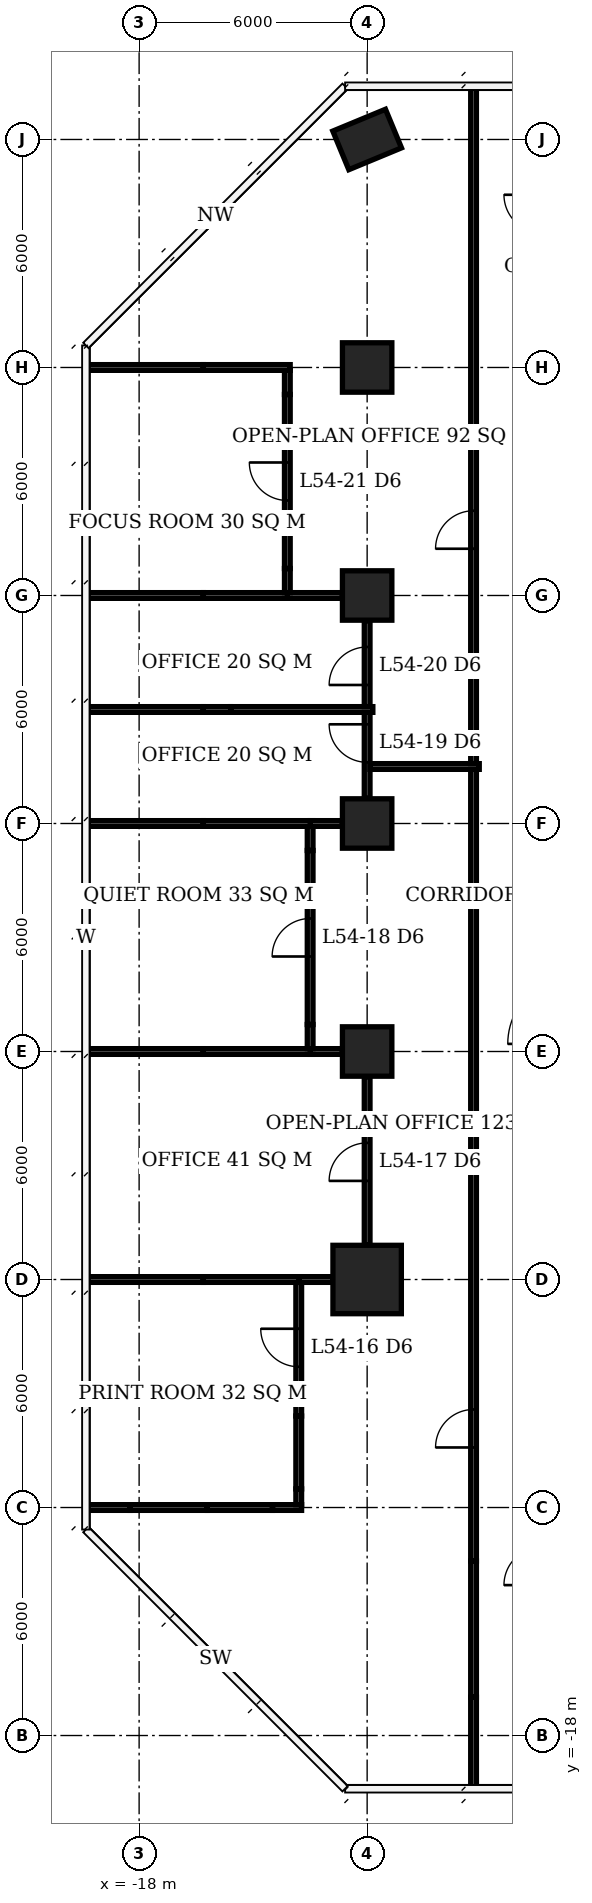
"""IFC4 building model, lengths in metres.
Left out: names, types, materials, properties, quantities, classifications, styles, units other than length and angle.
Written with IfcOpenShell. Run it as: python <this file> out.ifc"""

import sys

from ifc_helpers import new_model, si_unit, direction, frame, frame_2d, origin, origin_2d, place, context, subcontext, project, spatial, rectangle, extrude, element, fill, save


model = new_model("IFC4")
c1 = context("Model", 3, precision=1e-05, world=origin(), true_north=direction((0.0, 1.0)))
c2 = subcontext(c1, "Body", "Model", "MODEL_VIEW")
j1 = project(units=[si_unit("LENGTHUNIT", "METRE"), si_unit("PLANEANGLEUNIT", "RADIAN")], contexts=[c1])
p1 = place(None, origin())
s1 = spatial("IfcSite", under=j1, at=p1, CompositionType="ELEMENT")
p2 = place(p1, origin())
s2 = spatial("IfcBuilding", under=s1, at=p2, CompositionType="ELEMENT")
p3 = place(p2, frame((0.0, 0.0, 220.1)))
s3 = spatial("IfcBuildingStorey", under=s2, at=p3, CompositionType="ELEMENT", Elevation=220.1)
p4 = place(p3, frame((-12.0, -6.0, 0.0), z_axis=(0.0, 0.0, 1.0), x_axis=(1.0, 0.0, 0.0)))
e1 = element("IfcColumn", 1, at=p4, inside=s3, PredefinedType="COLUMN", context=c2, shape_type="SweptSolid", body=[
    extrude(rectangle(XDim=1.8, YDim=1.8, at=origin_2d()), origin(), (0.0, 0.0, 1.0), 3.9),
])
for number, where, z_axis, x_axis in (
    (2, (-12.0, 0.0, 0.0), (0.0, 0.0, 1.0), (1.0, 0.0, 0.0)),
    (3, (-12.0, 6.0, 0.0), (0.0, 0.0, 1.0), (1.0, 0.0, 0.0)),
    (4, (-12.0, 12.0, 0.0), (0.0, 0.0, 1.0), (1.0, 0.0, 0.0)),
    (5, (-12.0, 18.0, 0.0), (0.0, 0.0, 1.0), (1.0, 0.0, 0.0)),
):
    element("IfcColumn", number, at=place(p3, frame(where, z_axis=z_axis, x_axis=x_axis)), inside=s3, PredefinedType="COLUMN", context=c2, shape_type="SweptSolid", body=[
        extrude(rectangle(XDim=1.3, YDim=1.3, at=origin_2d()), origin(), (0.0, 0.0, 1.0), 3.9),
    ])
p5 = place(p3, frame((-12.0, 24.0, 0.0), z_axis=(0.0, 0.0, 1.0), x_axis=(0.923879532511, 0.382683432365, 0.0)))
e6 = element("IfcColumn", 6, at=p5, inside=s3, PredefinedType="COLUMN", context=c2, shape_type="SweptSolid", body=[
    extrude(rectangle(XDim=1.5, YDim=1.1, at=origin_2d()), origin(), (0.0, 0.0, 1.0), 3.9),
])
p6 = place(p3, frame((-19.4, -12.0, 0.0), z_axis=(0.0, 0.0, 1.0), x_axis=(1.0, 0.0, 0.0)))
e7 = element("IfcWall", 7, at=p6, inside=s3, PredefinedType="PARTITIONING", context=c2, shape_type="SweptSolid", body=[
    extrude(rectangle(XDim=1.163, YDim=0.15, at=frame_2d((0.582, 0.0))), origin(), (0.0, 0.0, 1.0), 3.65),
])
p7 = place(p3, frame((-18.237, -12.0, 0.0), z_axis=(0.0, 0.0, 1.0), x_axis=(1.0, 0.0, 0.0)))
e8 = element("IfcWall", 8, at=p7, inside=s3, PredefinedType="PARTITIONING", context=c2, shape_type="SweptSolid", body=[
    extrude(rectangle(XDim=2.029, YDim=0.15, at=frame_2d((1.015, 0.0))), origin(), (0.0, 0.0, 1.0), 2.65),
])
p8 = place(p3, frame((-16.208, -12.0, 0.0), z_axis=(0.0, 0.0, 1.0), x_axis=(1.0, 0.0, 0.0)))
e9 = element("IfcWall", 9, at=p8, inside=s3, PredefinedType="PARTITIONING", context=c2, shape_type="SweptSolid", body=[
    extrude(rectangle(XDim=1.718, YDim=0.15, at=frame_2d((0.859, 0.0))), origin(), (0.0, 0.0, 1.0), 3.65),
])
p9 = place(p3, frame((-14.49, -12.0, 0.0), z_axis=(0.0, 0.0, 1.0), x_axis=(1.0, 0.0, 0.0)))
e10 = element("IfcWall", 10, at=p9, inside=s3, PredefinedType="PARTITIONING", context=c2, shape_type="SweptSolid", body=[
    extrude(rectangle(XDim=0.765, YDim=0.15, at=frame_2d((0.382, 0.0))), origin(), (0.0, 0.0, 1.0), 2.65),
])
p10 = place(p3, frame((-19.4, -6.0, 0.0), z_axis=(0.0, 0.0, 1.0), x_axis=(1.0, 0.0, 0.0)))
e11 = element("IfcWall", 11, at=p10, inside=s3, PredefinedType="PARTITIONING", context=c2, shape_type="SweptSolid", body=[
    extrude(rectangle(XDim=3.09, YDim=0.15, at=frame_2d((1.545, 0.0))), origin(), (0.0, 0.0, 1.0), 3.65),
])
p11 = place(p3, frame((-16.31, -6.0, 0.0), z_axis=(0.0, 0.0, 1.0), x_axis=(1.0, 0.0, 0.0)))
e12 = element("IfcWall", 12, at=p11, inside=s3, PredefinedType="PARTITIONING", context=c2, shape_type="SweptSolid", body=[
    extrude(rectangle(XDim=2.585, YDim=0.15, at=frame_2d((1.292, 0.0))), origin(), (0.0, 0.0, 1.0), 2.65),
])
p12 = place(p3, frame((-13.8, -6.0, 0.0), z_axis=(0.0, 0.0, 1.0), x_axis=(1.0, 0.0, 0.0)))
e13 = element("IfcWall", 13, at=p12, inside=s3, PredefinedType="PARTITIONING", context=c2, shape_type="SweptSolid", body=[
    extrude(rectangle(XDim=0.9, YDim=0.15, at=frame_2d((0.45, 0.0))), origin(), (0.0, 0.0, 1.0), 2.65),
])
p13 = place(p3, frame((-19.35, 0.0, 0.0), z_axis=(0.0, 0.0, 1.0), x_axis=(1.0, 0.0, 0.0)))
e14 = element("IfcWall", 14, at=p13, inside=s3, PredefinedType="PARTITIONING", context=c2, shape_type="SweptSolid", body=[
    extrude(rectangle(XDim=3.04, YDim=0.15, at=frame_2d((1.52, 0.0))), origin(), (0.0, 0.0, 1.0), 3.65),
])
p14 = place(p3, frame((-16.31, 0.0, 0.0), z_axis=(0.0, 0.0, 1.0), x_axis=(1.0, 0.0, 0.0)))
e15 = element("IfcWall", 15, at=p14, inside=s3, PredefinedType="PARTITIONING", context=c2, shape_type="SweptSolid", body=[
    extrude(rectangle(XDim=2.885, YDim=0.15, at=frame_2d((1.442, 0.0))), origin(), (0.0, 0.0, 1.0), 2.65),
])
p15 = place(p3, frame((-13.5, 0.0, 0.0), z_axis=(0.0, 0.0, 1.0), x_axis=(1.0, 0.0, 0.0)))
e16 = element("IfcWall", 16, at=p15, inside=s3, PredefinedType="PARTITIONING", context=c2, shape_type="SweptSolid", body=[
    extrude(rectangle(XDim=0.85, YDim=0.15, at=frame_2d((0.425, 0.0))), origin(), (0.0, 0.0, 1.0), 2.65),
])
p16 = place(p3, frame((-19.35, 6.0, 0.0), z_axis=(0.0, 0.0, 1.0), x_axis=(1.0, 0.0, 0.0)))
e17 = element("IfcWall", 17, at=p16, inside=s3, PredefinedType="PARTITIONING", context=c2, shape_type="SweptSolid", body=[
    extrude(rectangle(XDim=3.04, YDim=0.15, at=frame_2d((1.52, 0.0))), origin(), (0.0, 0.0, 1.0), 3.65),
])
p17 = place(p3, frame((-16.31, 6.0, 0.0), z_axis=(0.0, 0.0, 1.0), x_axis=(1.0, 0.0, 0.0)))
e18 = element("IfcWall", 18, at=p17, inside=s3, PredefinedType="PARTITIONING", context=c2, shape_type="SweptSolid", body=[
    extrude(rectangle(XDim=2.885, YDim=0.15, at=frame_2d((1.442, 0.0))), origin(), (0.0, 0.0, 1.0), 2.65),
])
p18 = place(p3, frame((-13.5, 6.0, 0.0), z_axis=(0.0, 0.0, 1.0), x_axis=(1.0, 0.0, 0.0)))
e19 = element("IfcWall", 19, at=p18, inside=s3, PredefinedType="PARTITIONING", context=c2, shape_type="SweptSolid", body=[
    extrude(rectangle(XDim=0.85, YDim=0.15, at=frame_2d((0.425, 0.0))), origin(), (0.0, 0.0, 1.0), 2.65),
])
p19 = place(p3, frame((-19.4, 9.0, 0.0), z_axis=(0.0, 0.0, 1.0), x_axis=(1.0, 0.0, 0.0)))
e20 = element("IfcWall", 20, at=p19, inside=s3, PredefinedType="PARTITIONING", context=c2, shape_type="SweptSolid", body=[
    extrude(rectangle(XDim=3.09, YDim=0.15, at=frame_2d((1.545, 0.0))), origin(), (0.0, 0.0, 1.0), 3.65),
])
p20 = place(p3, frame((-16.31, 9.0, 0.0), z_axis=(0.0, 0.0, 1.0), x_axis=(1.0, 0.0, 0.0)))
e21 = element("IfcWall", 21, at=p20, inside=s3, PredefinedType="PARTITIONING", context=c2, shape_type="SweptSolid", body=[
    extrude(rectangle(XDim=0.72, YDim=0.15, at=frame_2d((0.36, 0.0))), origin(), (0.0, 0.0, 1.0), 2.65),
])
p21 = place(p3, frame((-15.59, 9.0, 0.0), z_axis=(0.0, 0.0, 1.0), x_axis=(1.0, 0.0, 0.0)))
e22 = element("IfcWall", 22, at=p21, inside=s3, PredefinedType="PARTITIONING", context=c2, shape_type="SweptSolid", body=[
    extrude(rectangle(XDim=3.74, YDim=0.15, at=frame_2d((1.87, 0.0))), origin(), (0.0, 0.0, 1.0), 3.65),
])
p22 = place(p3, frame((-19.4, 12.0, 0.0), z_axis=(0.0, 0.0, 1.0), x_axis=(1.0, 0.0, 0.0)))
e23 = element("IfcWall", 23, at=p22, inside=s3, PredefinedType="PARTITIONING", context=c2, shape_type="SweptSolid", body=[
    extrude(rectangle(XDim=3.09, YDim=0.15, at=frame_2d((1.545, 0.0))), origin(), (0.0, 0.0, 1.0), 3.65),
])
p23 = place(p3, frame((-16.31, 12.0, 0.0), z_axis=(0.0, 0.0, 1.0), x_axis=(1.0, 0.0, 0.0)))
e24 = element("IfcWall", 24, at=p23, inside=s3, PredefinedType="PARTITIONING", context=c2, shape_type="SweptSolid", body=[
    extrude(rectangle(XDim=2.285, YDim=0.15, at=frame_2d((1.143, 0.0))), origin(), (0.0, 0.0, 1.0), 2.65),
])
p24 = place(p3, frame((-14.1, 12.0, 0.0), z_axis=(0.0, 0.0, 1.0), x_axis=(1.0, 0.0, 0.0)))
e25 = element("IfcWall", 25, at=p24, inside=s3, PredefinedType="PARTITIONING", context=c2, shape_type="SweptSolid", body=[
    extrude(rectangle(XDim=1.45, YDim=0.15, at=frame_2d((0.725, 0.0))), origin(), (0.0, 0.0, 1.0), 2.65),
])
p25 = place(p3, frame((-19.4, 18.0, 0.0), z_axis=(0.0, 0.0, 1.0), x_axis=(1.0, 0.0, 0.0)))
e26 = element("IfcWall", 26, at=p25, inside=s3, PredefinedType="PARTITIONING", context=c2, shape_type="SweptSolid", body=[
    extrude(rectangle(XDim=3.09, YDim=0.15, at=frame_2d((1.545, 0.0))), origin(), (0.0, 0.0, 1.0), 3.65),
])
p26 = place(p3, frame((-16.31, 18.0, 0.0), z_axis=(0.0, 0.0, 1.0), x_axis=(1.0, 0.0, 0.0)))
e27 = element("IfcWall", 27, at=p26, inside=s3, PredefinedType="PARTITIONING", context=c2, shape_type="SweptSolid", body=[
    extrude(rectangle(XDim=2.285, YDim=0.15, at=frame_2d((1.143, 0.0))), origin(), (0.0, 0.0, 1.0), 2.65),
])
p27 = place(p3, frame((-14.1, 12.075, 0.0), z_axis=(0.0, 0.0, 1.0), x_axis=(0.0, 1.0, 0.0)))
e28 = element("IfcWall", 28, at=p27, inside=s3, PredefinedType="PARTITIONING", context=c2, shape_type="SweptSolid", body=[
    extrude(rectangle(XDim=0.635, YDim=0.15, at=frame_2d((0.317, 0.0))), origin(), (0.0, 0.0, 1.0), 2.65),
])
p28 = place(p3, frame((-14.1, 12.71, 0.0), z_axis=(0.0, 0.0, 1.0), x_axis=(0.0, 1.0, 0.0)))
e29 = element("IfcWall", 29, at=p28, inside=s3, PredefinedType="PARTITIONING", context=c2, shape_type="SweptSolid", body=[
    extrude(rectangle(XDim=4.58, YDim=0.15, at=frame_2d((2.29, 0.0))), origin(), (0.0, 0.0, 1.0), 3.65),
])
p29 = place(p28, frame((1.79, 0.0, 0.0)))
e30 = element("IfcOpeningElement", 30, at=p29, cuts=e29, PredefinedType="OPENING", context=c2, shape_type="SweptSolid", body=[
    extrude(rectangle(XDim=1.0, YDim=2.1, at=frame_2d((0.5, 1.05))), frame((0.0, 0.085, 0.0), z_axis=(0.0, -1.0, 0.0), x_axis=(1.0, 0.0, 0.0)), (0.0, 0.0, 1.0), 0.17),
])
p30 = place(p3, frame((-14.1, 17.29, 0.0), z_axis=(0.0, 0.0, 1.0), x_axis=(0.0, 1.0, 0.0)))
e31 = element("IfcWall", 31, at=p30, inside=s3, PredefinedType="PARTITIONING", context=c2, shape_type="SweptSolid", body=[
    extrude(rectangle(XDim=0.635, YDim=0.15, at=frame_2d((0.317, 0.0))), origin(), (0.0, 0.0, 1.0), 2.65),
])
p31 = place(p3, frame((-13.8, -11.925, 0.0), z_axis=(0.0, 0.0, 1.0), x_axis=(0.0, 1.0, 0.0)))
e32 = element("IfcWall", 32, at=p31, inside=s3, PredefinedType="PARTITIONING", context=c2, shape_type="SweptSolid", body=[
    extrude(rectangle(XDim=0.415, YDim=0.15, at=frame_2d((0.208, 0.0))), origin(), (0.0, 0.0, 1.0), 2.65),
])
p32 = place(p3, frame((-13.8, -11.51, 0.0), z_axis=(0.0, 0.0, 1.0), x_axis=(0.0, 1.0, 0.0)))
e33 = element("IfcWall", 33, at=p32, inside=s3, PredefinedType="PARTITIONING", context=c2, shape_type="SweptSolid", body=[
    extrude(rectangle(XDim=1.918, YDim=0.15, at=frame_2d((0.959, 0.0))), origin(), (0.0, 0.0, 1.0), 3.65),
])
p33 = place(p3, frame((-13.8, -9.592, 0.0), z_axis=(0.0, 0.0, 1.0), x_axis=(0.0, 1.0, 0.0)))
e34 = element("IfcWall", 34, at=p33, inside=s3, PredefinedType="PARTITIONING", context=c2, shape_type="SweptSolid", body=[
    extrude(rectangle(XDim=3.517, YDim=0.15, at=frame_2d((1.759, 0.0))), origin(), (0.0, 0.0, 1.0), 2.65),
])
p34 = place(p33, frame((1.296, 0.0, 0.0)))
e35 = element("IfcOpeningElement", 35, at=p34, cuts=e34, PredefinedType="OPENING", context=c2, shape_type="SweptSolid", body=[
    extrude(rectangle(XDim=1.0, YDim=2.1, at=frame_2d((0.5, 1.05))), frame((0.0, 0.085, 0.0), z_axis=(0.0, -1.0, 0.0), x_axis=(1.0, 0.0, 0.0)), (0.0, 0.0, 1.0), 0.17),
])
p35 = place(p3, frame((-13.5, 0.075, 0.0), z_axis=(0.0, 0.0, 1.0), x_axis=(0.0, 1.0, 0.0)))
e36 = element("IfcWall", 36, at=p35, inside=s3, PredefinedType="PARTITIONING", context=c2, shape_type="SweptSolid", body=[
    extrude(rectangle(XDim=0.635, YDim=0.15, at=frame_2d((0.317, 0.0))), origin(), (0.0, 0.0, 1.0), 2.65),
])
p36 = place(p3, frame((-13.5, 0.71, 0.0), z_axis=(0.0, 0.0, 1.0), x_axis=(0.0, 1.0, 0.0)))
e37 = element("IfcWall", 37, at=p36, inside=s3, PredefinedType="PARTITIONING", context=c2, shape_type="SweptSolid", body=[
    extrude(rectangle(XDim=4.58, YDim=0.15, at=frame_2d((2.29, 0.0))), origin(), (0.0, 0.0, 1.0), 3.65),
])
p37 = place(p36, frame((1.79, 0.0, 0.0)))
e38 = element("IfcOpeningElement", 38, at=p37, cuts=e37, PredefinedType="OPENING", context=c2, shape_type="SweptSolid", body=[
    extrude(rectangle(XDim=1.0, YDim=2.1, at=frame_2d((0.5, 1.05))), frame((0.0, 0.085, 0.0), z_axis=(0.0, -1.0, 0.0), x_axis=(1.0, 0.0, 0.0)), (0.0, 0.0, 1.0), 0.17),
])
p38 = place(p3, frame((-13.5, 5.29, 0.0), z_axis=(0.0, 0.0, 1.0), x_axis=(0.0, 1.0, 0.0)))
e39 = element("IfcWall", 39, at=p38, inside=s3, PredefinedType="PARTITIONING", context=c2, shape_type="SweptSolid", body=[
    extrude(rectangle(XDim=0.635, YDim=0.15, at=frame_2d((0.317, 0.0))), origin(), (0.0, 0.0, 1.0), 2.65),
])
p39 = place(p3, frame((-12.0, -5.1, 0.0), z_axis=(0.0, 0.0, 1.0), x_axis=(0.0, 1.0, 0.0)))
e40 = element("IfcWall", 40, at=p39, inside=s3, PredefinedType="PARTITIONING", context=c2, shape_type="SweptSolid", body=[
    extrude(rectangle(XDim=4.44, YDim=0.15, at=frame_2d((2.22, 0.0))), origin(), (0.0, 0.0, 1.0), 3.65),
])
p40 = place(p39, frame((1.695, 0.0, 0.0)))
e41 = element("IfcOpeningElement", 41, at=p40, cuts=e40, PredefinedType="OPENING", context=c2, shape_type="SweptSolid", body=[
    extrude(rectangle(XDim=1.0, YDim=2.1, at=frame_2d((0.5, 1.05))), frame((0.0, 0.085, 0.0), z_axis=(0.0, -1.0, 0.0), x_axis=(1.0, 0.0, 0.0)), (0.0, 0.0, 1.0), 0.17),
])
p41 = place(p3, frame((-12.0, 6.66, 0.0), z_axis=(0.0, 0.0, 1.0), x_axis=(0.0, 1.0, 0.0)))
e42 = element("IfcWall", 42, at=p41, inside=s3, PredefinedType="PARTITIONING", context=c2, shape_type="SweptSolid", body=[
    extrude(rectangle(XDim=2.265, YDim=0.15, at=frame_2d((1.133, 0.0))), origin(), (0.0, 0.0, 1.0), 3.65),
])
p42 = place(p41, frame((0.95, 0.0, 0.0)))
e43 = element("IfcOpeningElement", 43, at=p42, cuts=e42, PredefinedType="OPENING", context=c2, shape_type="SweptSolid", body=[
    extrude(rectangle(XDim=1.0, YDim=2.1, at=frame_2d((0.5, 1.05))), frame((0.0, 0.085, 0.0), z_axis=(0.0, -1.0, 0.0), x_axis=(1.0, 0.0, 0.0)), (0.0, 0.0, 1.0), 0.17),
])
p43 = place(p3, frame((-12.0, 9.075, 0.0), z_axis=(0.0, 0.0, 1.0), x_axis=(0.0, 1.0, 0.0)))
e44 = element("IfcWall", 44, at=p43, inside=s3, PredefinedType="PARTITIONING", context=c2, shape_type="SweptSolid", body=[
    extrude(rectangle(XDim=2.265, YDim=0.15, at=frame_2d((1.133, 0.0))), origin(), (0.0, 0.0, 1.0), 3.65),
])
p44 = place(p43, frame((0.57, 0.0, 0.0)))
e45 = element("IfcOpeningElement", 45, at=p44, cuts=e44, PredefinedType="OPENING", context=c2, shape_type="SweptSolid", body=[
    extrude(rectangle(XDim=1.0, YDim=2.1, at=frame_2d((0.5, 1.05))), frame((0.0, 0.085, 0.0), z_axis=(0.0, -1.0, 0.0), x_axis=(1.0, 0.0, 0.0)), (0.0, 0.0, 1.0), 0.17),
])
p45 = place(p3, frame((-11.925, 7.5, 0.0), z_axis=(0.0, 0.0, 1.0), x_axis=(1.0, 0.0, 0.0)))
e46 = element("IfcWall", 46, at=p45, inside=s3, PredefinedType="PARTITIONING", context=c2, shape_type="SweptSolid", body=[
    extrude(rectangle(XDim=2.875, YDim=0.15, at=frame_2d((1.438, 0.0))), origin(), (0.0, 0.0, 1.0), 3.65),
])
p46 = place(p3, frame((-9.2, -19.4, 0.0), z_axis=(0.0, 0.0, 1.0), x_axis=(0.0, 1.0, 0.0)))
e47 = element("IfcWall", 47, at=p46, inside=s3, PredefinedType="PARTITIONING", context=c2, shape_type="SweptSolid", body=[
    extrude(rectangle(XDim=2.408, YDim=0.15, at=frame_2d((1.204, 0.0))), origin(), (0.0, 0.0, 1.0), 3.65),
])
p47 = place(p3, frame((-9.2, -16.992, 0.0), z_axis=(0.0, 0.0, 1.0), x_axis=(0.0, 1.0, 0.0)))
e48 = element("IfcWall", 48, at=p47, inside=s3, PredefinedType="PARTITIONING", context=c2, shape_type="SweptSolid", body=[
    extrude(rectangle(XDim=3.584, YDim=0.15, at=frame_2d((1.792, 0.0))), origin(), (0.0, 0.0, 1.0), 2.65),
])
p48 = place(p3, frame((-9.2, -13.408, 0.0), z_axis=(0.0, 0.0, 1.0), x_axis=(0.0, 1.0, 0.0)))
e49 = element("IfcWall", 49, at=p48, inside=s3, PredefinedType="PARTITIONING", context=c2, shape_type="SweptSolid", body=[
    extrude(rectangle(XDim=20.833, YDim=0.15, at=frame_2d((10.417, 0.0))), origin(), (0.0, 0.0, 1.0), 3.65),
])
p49 = place(p48, frame((2.988, 0.0, 0.0)))
e50 = element("IfcOpeningElement", 50, at=p49, cuts=e49, PredefinedType="OPENING", context=c2, shape_type="SweptSolid", body=[
    extrude(rectangle(XDim=1.0, YDim=2.1, at=frame_2d((0.5, 1.05))), frame((0.0, 0.085, 0.0), z_axis=(0.0, -1.0, 0.0), x_axis=(1.0, 0.0, 0.0)), (0.0, 0.0, 1.0), 0.17),
])
p50 = place(p3, frame((-9.2, 7.575, 0.0), z_axis=(0.0, 0.0, 1.0), x_axis=(0.0, 1.0, 0.0)))
e51 = element("IfcWall", 51, at=p50, inside=s3, PredefinedType="PARTITIONING", context=c2, shape_type="SweptSolid", body=[
    extrude(rectangle(XDim=17.825, YDim=0.15, at=frame_2d((8.913, 0.0))), origin(), (0.0, 0.0, 1.0), 3.65),
])
p51 = place(p50, frame((5.655, 0.0, 0.0)))
e52 = element("IfcOpeningElement", 52, at=p51, cuts=e51, PredefinedType="OPENING", context=c2, shape_type="SweptSolid", body=[
    extrude(rectangle(XDim=1.0, YDim=2.1, at=frame_2d((0.5, 1.05))), frame((0.0, 0.085, 0.0), z_axis=(0.0, -1.0, 0.0), x_axis=(1.0, 0.0, 0.0)), (0.0, 0.0, 1.0), 0.17),
])
p52 = place(p34, origin())
e53 = element("IfcDoor", 53, at=p52, inside=s3, OperationType="SINGLE_SWING_RIGHT", PredefinedType="DOOR", context=c2, shape_type="SweptSolid", body=[
    extrude(rectangle(XDim=1.0, YDim=2.1, at=frame_2d((0.5, 1.05))), frame((0.0, 0.025, 0.0), z_axis=(0.0, -1.0, 0.0), x_axis=(1.0, 0.0, 0.0)), (0.0, 0.0, 1.0), 0.05),
])
fill(e35, e53)
p53 = place(p40, origin())
e54 = element("IfcDoor", 54, at=p53, inside=s3, OperationType="SINGLE_SWING_LEFT", PredefinedType="DOOR", context=c2, shape_type="SweptSolid", body=[
    extrude(rectangle(XDim=1.0, YDim=2.1, at=frame_2d((0.5, 1.05))), frame((0.0, 0.025, 0.0), z_axis=(0.0, -1.0, 0.0), x_axis=(1.0, 0.0, 0.0)), (0.0, 0.0, 1.0), 0.05),
])
fill(e41, e54)
p54 = place(p37, origin())
e55 = element("IfcDoor", 55, at=p54, inside=s3, OperationType="SINGLE_SWING_LEFT", PredefinedType="DOOR", context=c2, shape_type="SweptSolid", body=[
    extrude(rectangle(XDim=1.0, YDim=2.1, at=frame_2d((0.5, 1.05))), frame((0.0, 0.025, 0.0), z_axis=(0.0, -1.0, 0.0), x_axis=(1.0, 0.0, 0.0)), (0.0, 0.0, 1.0), 0.05),
])
fill(e38, e55)
p55 = place(p42, origin())
e56 = element("IfcDoor", 56, at=p55, inside=s3, OperationType="SINGLE_SWING_RIGHT", PredefinedType="DOOR", context=c2, shape_type="SweptSolid", body=[
    extrude(rectangle(XDim=1.0, YDim=2.1, at=frame_2d((0.5, 1.05))), frame((0.0, 0.025, 0.0), z_axis=(0.0, -1.0, 0.0), x_axis=(1.0, 0.0, 0.0)), (0.0, 0.0, 1.0), 0.05),
])
fill(e43, e56)
p56 = place(p44, origin())
e57 = element("IfcDoor", 57, at=p56, inside=s3, OperationType="SINGLE_SWING_LEFT", PredefinedType="DOOR", context=c2, shape_type="SweptSolid", body=[
    extrude(rectangle(XDim=1.0, YDim=2.1, at=frame_2d((0.5, 1.05))), frame((0.0, 0.025, 0.0), z_axis=(0.0, -1.0, 0.0), x_axis=(1.0, 0.0, 0.0)), (0.0, 0.0, 1.0), 0.05),
])
fill(e45, e57)
p57 = place(p29, origin())
e58 = element("IfcDoor", 58, at=p57, inside=s3, OperationType="SINGLE_SWING_RIGHT", PredefinedType="DOOR", context=c2, shape_type="SweptSolid", body=[
    extrude(rectangle(XDim=1.0, YDim=2.1, at=frame_2d((0.5, 1.05))), frame((0.0, 0.025, 0.0), z_axis=(0.0, -1.0, 0.0), x_axis=(1.0, 0.0, 0.0)), (0.0, 0.0, 1.0), 0.05),
])
fill(e30, e58)
p58 = place(p49, origin())
e59 = element("IfcDoor", 59, at=p58, inside=s3, OperationType="SINGLE_SWING_LEFT", PredefinedType="DOOR", context=c2, shape_type="SweptSolid", body=[
    extrude(rectangle(XDim=1.0, YDim=2.1, at=frame_2d((0.5, 1.05))), frame((0.0, 0.025, 0.0), z_axis=(0.0, -1.0, 0.0), x_axis=(1.0, 0.0, 0.0)), (0.0, 0.0, 1.0), 0.05),
])
fill(e50, e59)
p59 = place(p51, origin())
e60 = element("IfcDoor", 60, at=p59, inside=s3, OperationType="SINGLE_SWING_LEFT", PredefinedType="DOOR", context=c2, shape_type="SweptSolid", body=[
    extrude(rectangle(XDim=1.0, YDim=2.1, at=frame_2d((0.5, 1.05))), frame((0.0, 0.025, 0.0), z_axis=(0.0, -1.0, 0.0), x_axis=(1.0, 0.0, 0.0)), (0.0, 0.0, 1.0), 0.05),
])
fill(e52, e60)
save(model, sys.argv[1])
